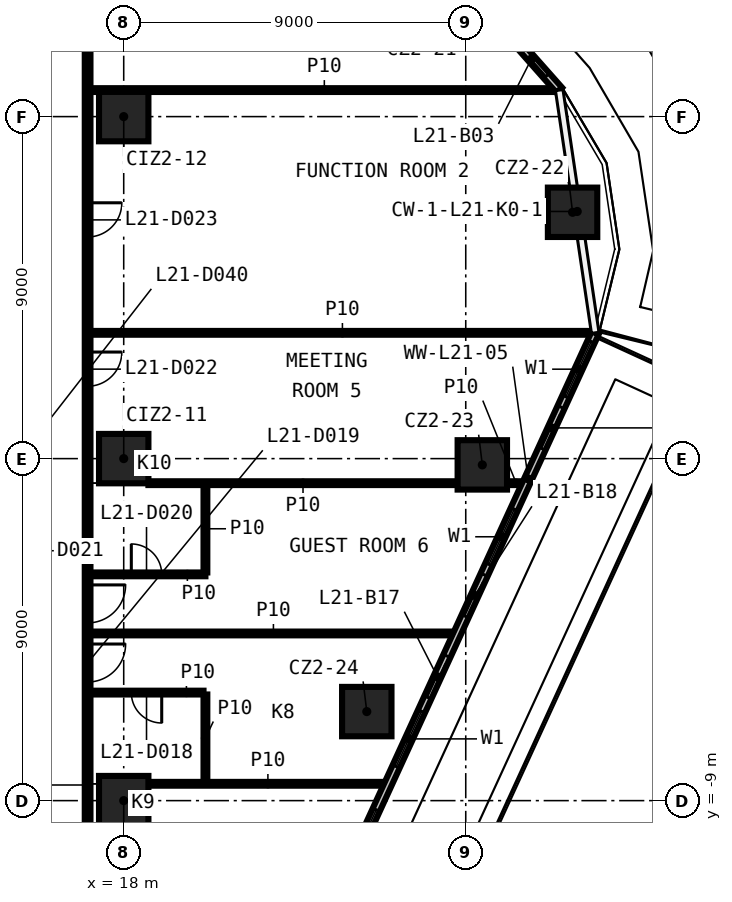
"""IFC4 building model, lengths in metres.
Left out: names, types, materials, properties, quantities, classifications, styles, units other than length and angle.
Written with IfcOpenShell. Run it as: python <this file> out.ifc"""

import sys

from ifc_helpers import new_model, si_unit, direction, frame, frame_2d, origin, origin_2d, place, context, subcontext, project, spatial, rectangle, extrude, element, fill, save


model = new_model("IFC4")
c1 = context("Model", 3, precision=1e-05, world=origin(), true_north=direction((0.0, 1.0)))
c2 = subcontext(c1, "Body", "Model", "MODEL_VIEW")
j1 = project(units=[si_unit("LENGTHUNIT", "METRE"), si_unit("PLANEANGLEUNIT", "RADIAN")], contexts=[c1])
p1 = place(None, origin())
s1 = spatial("IfcSite", under=j1, at=p1, CompositionType="ELEMENT")
p2 = place(p1, origin())
s2 = spatial("IfcBuilding", under=s1, at=p2, CompositionType="ELEMENT")
p3 = place(p2, frame((0.0, 0.0, 102.6)))
s3 = spatial("IfcBuildingStorey", under=s2, at=p3, CompositionType="ELEMENT", Elevation=102.6)
for number, where, z_axis, x_axis in (
    (1, (29.811, 6.482, 0.0), (0.0, 0.0, 1.0), (1.0, 0.0, 0.0)),
    (2, (27.436, -0.165, 0.0), (0.0, 0.0, 1.0), (1.0, 0.0, 0.0)),
    (3, (24.396, -6.657, 0.0), (0.0, 0.0, 1.0), (1.0, 0.0, 0.0)),
    (4, (18.0, -9.0, 0.0), (0.0, 0.0, 1.0), (1.0, 0.0, 0.0)),
    (5, (18.0, 0.0, 0.0), (0.0, 0.0, 1.0), (1.0, 0.0, 0.0)),
    (6, (18.0, 9.0, 0.0), (0.0, 0.0, 1.0), (1.0, 0.0, 0.0)),
):
    element("IfcColumn", number, at=place(p3, frame(where, z_axis=z_axis, x_axis=x_axis)), inside=s3, PredefinedType="COLUMN", context=c2, shape_type="SweptSolid", body=[
        extrude(rectangle(XDim=1.3, YDim=1.3, at=origin_2d()), origin(), (0.0, 0.0, 1.0), 3.3),
    ])
p4 = place(p3, frame((18.65, -8.557, 0.0), z_axis=(0.0, 0.0, 1.0), x_axis=(1.0, 0.0, 0.0)))
e7 = element("IfcWall", 7, at=p4, inside=s3, PredefinedType="PARTITIONING", context=c2, shape_type="SweptSolid", body=[
    extrude(rectangle(XDim=6.288, YDim=0.1, at=frame_2d((3.144, 0.0))), origin(), (0.0, 0.0, 1.0), 3.3),
])
p5 = place(p3, frame((20.1, -6.157, 0.0), z_axis=(0.0, 0.0, 1.0), x_axis=(-1.0, 0.0, 0.0)))
e8 = element("IfcWall", 8, at=p5, inside=s3, PredefinedType="PARTITIONING", context=c2, shape_type="SweptSolid", body=[
    extrude(rectangle(XDim=2.975, YDim=0.1, at=frame_2d((1.488, 0.0))), origin(), (0.0, 0.0, 1.0), 3.3),
])
p6 = place(p5, frame((1.1, 0.0, 0.0)))
e9 = element("IfcOpeningElement", 9, at=p6, cuts=e8, PredefinedType="OPENING", context=c2, shape_type="SweptSolid", body=[
    extrude(rectangle(XDim=0.8, YDim=2.1, at=frame_2d((0.4, 1.05))), frame((0.0, 0.06, 0.0), z_axis=(0.0, -1.0, 0.0), x_axis=(1.0, 0.0, 0.0)), (0.0, 0.0, 1.0), 0.12),
])
p7 = place(p3, frame((17.125, -4.601, 0.0), z_axis=(0.0, 0.0, 1.0), x_axis=(1.0, 0.0, 0.0)))
e10 = element("IfcWall", 10, at=p7, inside=s3, PredefinedType="PARTITIONING", context=c2, shape_type="SweptSolid", body=[
    extrude(rectangle(XDim=9.629, YDim=0.1, at=frame_2d((4.814, 0.0))), origin(), (0.0, 0.0, 1.0), 3.3),
])
p8 = place(p3, frame((17.125, -3.046, 0.0), z_axis=(0.0, 0.0, 1.0), x_axis=(1.0, 0.0, 0.0)))
e11 = element("IfcWall", 11, at=p8, inside=s3, PredefinedType="PARTITIONING", context=c2, shape_type="SweptSolid", body=[
    extrude(rectangle(XDim=3.025, YDim=0.1, at=frame_2d((1.512, 0.0))), origin(), (0.0, 0.0, 1.0), 3.3),
])
p9 = place(p8, frame((1.075, 0.0, 0.0)))
e12 = element("IfcOpeningElement", 12, at=p9, cuts=e11, PredefinedType="OPENING", context=c2, shape_type="SweptSolid", body=[
    extrude(rectangle(XDim=0.8, YDim=2.1, at=frame_2d((0.4, 1.05))), frame((0.0, 0.06, 0.0), z_axis=(0.0, -1.0, 0.0), x_axis=(1.0, 0.0, 0.0)), (0.0, 0.0, 1.0), 0.12),
])
p10 = place(p3, frame((18.65, -0.646, 0.0), z_axis=(0.0, 0.0, 1.0), x_axis=(1.0, 0.0, 0.0)))
e13 = element("IfcWall", 13, at=p10, inside=s3, PredefinedType="PARTITIONING", context=c2, shape_type="SweptSolid", body=[
    extrude(rectangle(XDim=8.136, YDim=0.1, at=frame_2d((4.068, 0.0))), origin(), (0.0, 0.0, 1.0), 3.3),
])
p11 = place(p3, frame((28.086, -0.646, 0.0), z_axis=(0.0, 0.0, 1.0), x_axis=(1.0, 0.0, 0.0)))
e14 = element("IfcWall", 14, at=p11, inside=s3, PredefinedType="PARTITIONING", context=c2, shape_type="SweptSolid", body=[
    extrude(rectangle(XDim=0.483, YDim=0.1, at=frame_2d((0.242, 0.0))), origin(), (0.0, 0.0, 1.0), 3.3),
])
p12 = place(p3, frame((17.125, 3.31, 0.0), z_axis=(0.0, 0.0, 1.0), x_axis=(1.0, 0.0, 0.0)))
e15 = element("IfcWall", 15, at=p12, inside=s3, PredefinedType="PARTITIONING", context=c2, shape_type="SweptSolid", body=[
    extrude(rectangle(XDim=13.26, YDim=0.1, at=frame_2d((6.63, 0.0))), origin(), (0.0, 0.0, 1.0), 3.3),
])
p13 = place(p3, frame((17.125, 9.698, 0.0), z_axis=(0.0, 0.0, 1.0), x_axis=(1.0, 0.0, 0.0)))
e16 = element("IfcWall", 16, at=p13, inside=s3, PredefinedType="PARTITIONING", context=c2, shape_type="SweptSolid", body=[
    extrude(rectangle(XDim=12.308, YDim=0.1, at=frame_2d((6.154, 0.0))), origin(), (0.0, 0.0, 1.0), 3.3),
])
p14 = place(p3, frame((20.15, -8.507, 0.0), z_axis=(0.0, 0.0, 1.0), x_axis=(0.0, 1.0, 0.0)))
e17 = element("IfcWall", 17, at=p14, inside=s3, PredefinedType="PARTITIONING", context=c2, shape_type="SweptSolid", body=[
    extrude(rectangle(XDim=2.3, YDim=0.1, at=frame_2d((1.15, 0.0))), origin(), (0.0, 0.0, 1.0), 3.3),
])
p15 = place(p3, frame((20.15, -2.996, 0.0), z_axis=(0.0, 0.0, 1.0), x_axis=(0.0, 1.0, 0.0)))
e18 = element("IfcWall", 18, at=p15, inside=s3, PredefinedType="PARTITIONING", context=c2, shape_type="SweptSolid", body=[
    extrude(rectangle(XDim=2.3, YDim=0.1, at=frame_2d((1.15, 0.0))), origin(), (0.0, 0.0, 1.0), 3.3),
])
p16 = place(p3, frame((17.05, 13.975, 0.0), z_axis=(0.0, 0.0, 1.0), x_axis=(0.0, -1.0, 0.0)))
e19 = element("IfcWall", 19, at=p16, inside=s3, PredefinedType="PARTITIONING", context=c2, shape_type="SweptSolid", body=[
    extrude(rectangle(XDim=27.95, YDim=0.15, at=frame_2d((13.975, 0.0))), origin(), (0.0, 0.0, 1.0), 3.3),
])
p17 = place(p16, frame((25.274, 0.0, 0.0)))
e20 = element("IfcOpeningElement", 20, at=p17, cuts=e19, PredefinedType="OPENING", context=c2, shape_type="SweptSolid", body=[
    extrude(rectangle(XDim=0.9, YDim=2.1, at=frame_2d((0.45, 1.05))), frame((0.0, 0.085, 0.0), z_axis=(0.0, -1.0, 0.0), x_axis=(1.0, 0.0, 0.0)), (0.0, 0.0, 1.0), 0.17),
])
p18 = place(p16, frame((18.854, 0.0, 0.0)))
e21 = element("IfcOpeningElement", 21, at=p18, cuts=e19, PredefinedType="OPENING", context=c2, shape_type="SweptSolid", body=[
    extrude(rectangle(XDim=1.0, YDim=2.1, at=frame_2d((0.5, 1.05))), frame((0.0, 0.085, 0.0), z_axis=(0.0, -1.0, 0.0), x_axis=(1.0, 0.0, 0.0)), (0.0, 0.0, 1.0), 0.17),
])
p19 = place(p16, frame((17.299, 0.0, 0.0)))
e22 = element("IfcOpeningElement", 22, at=p19, cuts=e19, PredefinedType="OPENING", context=c2, shape_type="SweptSolid", body=[
    extrude(rectangle(XDim=1.0, YDim=2.1, at=frame_2d((0.5, 1.05))), frame((0.0, 0.085, 0.0), z_axis=(0.0, -1.0, 0.0), x_axis=(1.0, 0.0, 0.0)), (0.0, 0.0, 1.0), 0.17),
])
p20 = place(p16, frame((11.171, 0.0, 0.0)))
e23 = element("IfcOpeningElement", 23, at=p20, cuts=e19, PredefinedType="OPENING", context=c2, shape_type="SweptSolid", body=[
    extrude(rectangle(XDim=0.9, YDim=2.1, at=frame_2d((0.45, 1.05))), frame((0.0, 0.085, 0.0), z_axis=(0.0, -1.0, 0.0), x_axis=(1.0, 0.0, 0.0)), (0.0, 0.0, 1.0), 0.17),
])
p21 = place(p16, frame((7.243, 0.0, 0.0)))
e24 = element("IfcOpeningElement", 24, at=p21, cuts=e19, PredefinedType="OPENING", context=c2, shape_type="SweptSolid", body=[
    extrude(rectangle(XDim=0.9, YDim=2.1, at=frame_2d((0.45, 1.05))), frame((0.0, 0.085, 0.0), z_axis=(0.0, -1.0, 0.0), x_axis=(1.0, 0.0, 0.0)), (0.0, 0.0, 1.0), 0.17),
])
p22 = place(p16, frame((2.153, 0.0, 0.0)))
e25 = element("IfcOpeningElement", 25, at=p22, cuts=e19, PredefinedType="OPENING", context=c2, shape_type="SweptSolid", body=[
    extrude(rectangle(XDim=0.9, YDim=2.1, at=frame_2d((0.45, 1.05))), frame((0.0, 0.085, 0.0), z_axis=(0.0, -1.0, 0.0), x_axis=(1.0, 0.0, 0.0)), (0.0, 0.0, 1.0), 0.17),
])
p23 = place(p3, frame((29.46, 9.698, 0.0), z_axis=(0.0, 0.0, 1.0), x_axis=(-0.662868291848, 0.748736020011, 0.0)))
e26 = element("IfcWall", 26, at=p23, inside=s3, PredefinedType="SOLIDWALL", context=c2, shape_type="SweptSolid", body=[
    extrude(rectangle(XDim=4.472, YDim=0.2, at=frame_2d((2.236, 0.0))), origin(), (0.0, 0.0, 1.0), 3.25),
])
p24 = place(p23, frame((2.0, 0.0, 0.6)))
e27 = element("IfcOpeningElement", 27, at=p24, cuts=e26, PredefinedType="OPENING", context=c2, shape_type="SweptSolid", body=[
    extrude(rectangle(XDim=1.6, YDim=2.4, at=frame_2d((0.8, 1.2))), frame((0.0, 0.11, 0.0), z_axis=(0.0, -1.0, 0.0), x_axis=(1.0, 0.0, 0.0)), (0.0, 0.0, 1.0), 0.22),
])
p25 = place(p23, frame((0.5, 0.0, 0.0)))
e28 = element("IfcOpeningElement", 28, at=p25, cuts=e26, PredefinedType="OPENING", context=c2, shape_type="SweptSolid", body=[
    extrude(rectangle(XDim=1.2, YDim=2.4, at=frame_2d((0.6, 1.2))), frame((0.0, 0.11, 0.0), z_axis=(0.0, -1.0, 0.0), x_axis=(1.0, 0.0, 0.0)), (0.0, 0.0, 1.0), 0.22),
])
p26 = place(p3, frame((21.329, -16.468, 0.0), z_axis=(0.0, 0.0, 1.0), x_axis=(0.417117833448, 0.908852415423, 0.0)))
e29 = element("IfcWall", 29, at=p26, inside=s3, PredefinedType="SOLIDWALL", context=c2, shape_type="SweptSolid", body=[
    extrude(rectangle(XDim=21.761, YDim=0.2, at=frame_2d((10.881, 0.0))), origin(), (0.0, 0.0, 1.0), 3.25),
])
p27 = place(p26, frame((2.0, 0.0, 0.6)))
e30 = element("IfcOpeningElement", 30, at=p27, cuts=e29, PredefinedType="OPENING", context=c2, shape_type="SweptSolid", body=[
    extrude(rectangle(XDim=1.6, YDim=2.4, at=frame_2d((0.8, 1.2))), frame((0.0, 0.11, 0.0), z_axis=(0.0, -1.0, 0.0), x_axis=(1.0, 0.0, 0.0)), (0.0, 0.0, 1.0), 0.22),
])
p28 = place(p26, frame((0.5, 0.0, 0.0)))
e31 = element("IfcOpeningElement", 31, at=p28, cuts=e29, PredefinedType="OPENING", context=c2, shape_type="SweptSolid", body=[
    extrude(rectangle(XDim=1.2, YDim=2.4, at=frame_2d((0.6, 1.2))), frame((0.0, 0.11, 0.0), z_axis=(0.0, -1.0, 0.0), x_axis=(1.0, 0.0, 0.0)), (0.0, 0.0, 1.0), 0.22),
])
p29 = place(p26, frame((6.352, 0.0, 0.6)))
e32 = element("IfcOpeningElement", 32, at=p29, cuts=e29, PredefinedType="OPENING", context=c2, shape_type="SweptSolid", body=[
    extrude(rectangle(XDim=1.6, YDim=2.4, at=frame_2d((0.8, 1.2))), frame((0.0, 0.11, 0.0), z_axis=(0.0, -1.0, 0.0), x_axis=(1.0, 0.0, 0.0)), (0.0, 0.0, 1.0), 0.22),
])
p30 = place(p26, frame((4.852, 0.0, 0.0)))
e33 = element("IfcOpeningElement", 33, at=p30, cuts=e29, PredefinedType="OPENING", context=c2, shape_type="SweptSolid", body=[
    extrude(rectangle(XDim=1.2, YDim=2.4, at=frame_2d((0.6, 1.2))), frame((0.0, 0.11, 0.0), z_axis=(0.0, -1.0, 0.0), x_axis=(1.0, 0.0, 0.0)), (0.0, 0.0, 1.0), 0.22),
])
p31 = place(p26, frame((9.205, 0.0, 0.6)))
e34 = element("IfcOpeningElement", 34, at=p31, cuts=e29, PredefinedType="OPENING", context=c2, shape_type="SweptSolid", body=[
    extrude(rectangle(XDim=1.6, YDim=2.4, at=frame_2d((0.8, 1.2))), frame((0.0, 0.11, 0.0), z_axis=(0.0, -1.0, 0.0), x_axis=(1.0, 0.0, 0.0)), (0.0, 0.0, 1.0), 0.22),
])
p32 = place(p26, frame((11.205, 0.0, 0.0)))
e35 = element("IfcOpeningElement", 35, at=p32, cuts=e29, PredefinedType="OPENING", context=c2, shape_type="SweptSolid", body=[
    extrude(rectangle(XDim=1.2, YDim=2.4, at=frame_2d((0.6, 1.2))), frame((0.0, 0.11, 0.0), z_axis=(0.0, -1.0, 0.0), x_axis=(1.0, 0.0, 0.0)), (0.0, 0.0, 1.0), 0.22),
])
p33 = place(p26, frame((15.057, 0.0, 0.6)))
e36 = element("IfcOpeningElement", 36, at=p33, cuts=e29, PredefinedType="OPENING", context=c2, shape_type="SweptSolid", body=[
    extrude(rectangle(XDim=1.6, YDim=2.4, at=frame_2d((0.8, 1.2))), frame((0.0, 0.11, 0.0), z_axis=(0.0, -1.0, 0.0), x_axis=(1.0, 0.0, 0.0)), (0.0, 0.0, 1.0), 0.22),
])
p34 = place(p26, frame((13.557, 0.0, 0.0)))
e37 = element("IfcOpeningElement", 37, at=p34, cuts=e29, PredefinedType="OPENING", context=c2, shape_type="SweptSolid", body=[
    extrude(rectangle(XDim=1.2, YDim=2.4, at=frame_2d((0.6, 1.2))), frame((0.0, 0.11, 0.0), z_axis=(0.0, -1.0, 0.0), x_axis=(1.0, 0.0, 0.0)), (0.0, 0.0, 1.0), 0.22),
])
p35 = place(p26, frame((19.909, 0.0, 0.6)))
e38 = element("IfcOpeningElement", 38, at=p35, cuts=e29, PredefinedType="OPENING", context=c2, shape_type="SweptSolid", body=[
    extrude(rectangle(XDim=1.6, YDim=2.4, at=frame_2d((0.8, 1.2))), frame((0.0, 0.11, 0.0), z_axis=(0.0, -1.0, 0.0), x_axis=(1.0, 0.0, 0.0)), (0.0, 0.0, 1.0), 0.22),
])
p36 = place(p26, frame((18.409, 0.0, 0.0)))
e39 = element("IfcOpeningElement", 39, at=p36, cuts=e29, PredefinedType="OPENING", context=c2, shape_type="SweptSolid", body=[
    extrude(rectangle(XDim=1.2, YDim=2.4, at=frame_2d((0.6, 1.2))), frame((0.0, 0.11, 0.0), z_axis=(0.0, -1.0, 0.0), x_axis=(1.0, 0.0, 0.0)), (0.0, 0.0, 1.0), 0.22),
])
p37 = place(p6, origin())
e40 = element("IfcDoor", 40, at=p37, inside=s3, OperationType="SINGLE_SWING_LEFT", PredefinedType="DOOR", context=c2, shape_type="SweptSolid", body=[
    extrude(rectangle(XDim=0.8, YDim=2.1, at=frame_2d((0.4, 1.05))), frame((0.0, 0.025, 0.0), z_axis=(0.0, -1.0, 0.0), x_axis=(1.0, 0.0, 0.0)), (0.0, 0.0, 1.0), 0.05),
])
fill(e9, e40)
p38 = place(p18, origin())
e41 = element("IfcDoor", 41, at=p38, inside=s3, OperationType="SINGLE_SWING_RIGHT", PredefinedType="DOOR", context=c2, shape_type="SweptSolid", body=[
    extrude(rectangle(XDim=1.0, YDim=2.1, at=frame_2d((0.5, 1.05))), frame((0.0, 0.025, 0.0), z_axis=(0.0, -1.0, 0.0), x_axis=(1.0, 0.0, 0.0)), (0.0, 0.0, 1.0), 0.05),
])
fill(e21, e41)
p39 = place(p9, origin())
e42 = element("IfcDoor", 42, at=p39, inside=s3, OperationType="SINGLE_SWING_RIGHT", PredefinedType="DOOR", context=c2, shape_type="SweptSolid", body=[
    extrude(rectangle(XDim=0.8, YDim=2.1, at=frame_2d((0.4, 1.05))), frame((0.0, 0.025, 0.0), z_axis=(0.0, -1.0, 0.0), x_axis=(1.0, 0.0, 0.0)), (0.0, 0.0, 1.0), 0.05),
])
fill(e12, e42)
p40 = place(p19, origin())
e43 = element("IfcDoor", 43, at=p40, inside=s3, OperationType="SINGLE_SWING_LEFT", PredefinedType="DOOR", context=c2, shape_type="SweptSolid", body=[
    extrude(rectangle(XDim=1.0, YDim=2.1, at=frame_2d((0.5, 1.05))), frame((0.0, 0.025, 0.0), z_axis=(0.0, -1.0, 0.0), x_axis=(1.0, 0.0, 0.0)), (0.0, 0.0, 1.0), 0.05),
])
fill(e22, e43)
p41 = place(p20, origin())
e44 = element("IfcDoor", 44, at=p41, inside=s3, OperationType="SINGLE_SWING_RIGHT", PredefinedType="DOOR", context=c2, shape_type="SweptSolid", body=[
    extrude(rectangle(XDim=0.9, YDim=2.1, at=frame_2d((0.45, 1.05))), frame((0.0, 0.025, 0.0), z_axis=(0.0, -1.0, 0.0), x_axis=(1.0, 0.0, 0.0)), (0.0, 0.0, 1.0), 0.05),
])
fill(e23, e44)
p42 = place(p21, origin())
e45 = element("IfcDoor", 45, at=p42, inside=s3, OperationType="SINGLE_SWING_LEFT", PredefinedType="DOOR", context=c2, shape_type="SweptSolid", body=[
    extrude(rectangle(XDim=0.9, YDim=2.1, at=frame_2d((0.45, 1.05))), frame((0.0, 0.025, 0.0), z_axis=(0.0, -1.0, 0.0), x_axis=(1.0, 0.0, 0.0)), (0.0, 0.0, 1.0), 0.05),
])
fill(e24, e45)
p43 = place(p25, origin())
e46 = element("IfcDoor", 46, at=p43, inside=s3, OperationType="SLIDING_TO_LEFT", PredefinedType="DOOR", context=c2, shape_type="SweptSolid", body=[
    extrude(rectangle(XDim=1.2, YDim=2.4, at=frame_2d((0.6, 1.2))), frame((0.0, 0.025, 0.0), z_axis=(0.0, -1.0, 0.0), x_axis=(1.0, 0.0, 0.0)), (0.0, 0.0, 1.0), 0.05),
])
fill(e28, e46)
p44 = place(p29, origin())
e47 = element("IfcWindow", 47, at=p44, inside=s3, PartitioningType="SINGLE_PANEL", PredefinedType="WINDOW", context=c2, shape_type="SweptSolid", body=[
    extrude(rectangle(XDim=1.6, YDim=2.4, at=frame_2d((0.8, 1.2))), frame((0.0, 0.03, 0.0), z_axis=(0.0, -1.0, 0.0), x_axis=(1.0, 0.0, 0.0)), (0.0, 0.0, 1.0), 0.06),
])
fill(e32, e47)
p45 = place(p31, origin())
e48 = element("IfcWindow", 48, at=p45, inside=s3, PartitioningType="SINGLE_PANEL", PredefinedType="WINDOW", context=c2, shape_type="SweptSolid", body=[
    extrude(rectangle(XDim=1.6, YDim=2.4, at=frame_2d((0.8, 1.2))), frame((0.0, 0.03, 0.0), z_axis=(0.0, -1.0, 0.0), x_axis=(1.0, 0.0, 0.0)), (0.0, 0.0, 1.0), 0.06),
])
fill(e34, e48)
p46 = place(p32, origin())
e49 = element("IfcDoor", 49, at=p46, inside=s3, OperationType="SLIDING_TO_LEFT", PredefinedType="DOOR", context=c2, shape_type="SweptSolid", body=[
    extrude(rectangle(XDim=1.2, YDim=2.4, at=frame_2d((0.6, 1.2))), frame((0.0, 0.025, 0.0), z_axis=(0.0, -1.0, 0.0), x_axis=(1.0, 0.0, 0.0)), (0.0, 0.0, 1.0), 0.05),
])
fill(e35, e49)
p47 = place(p33, origin())
e50 = element("IfcWindow", 50, at=p47, inside=s3, PartitioningType="SINGLE_PANEL", PredefinedType="WINDOW", context=c2, shape_type="SweptSolid", body=[
    extrude(rectangle(XDim=1.6, YDim=2.4, at=frame_2d((0.8, 1.2))), frame((0.0, 0.03, 0.0), z_axis=(0.0, -1.0, 0.0), x_axis=(1.0, 0.0, 0.0)), (0.0, 0.0, 1.0), 0.06),
])
fill(e36, e50)
p48 = place(p34, origin())
e51 = element("IfcDoor", 51, at=p48, inside=s3, OperationType="SLIDING_TO_LEFT", PredefinedType="DOOR", context=c2, shape_type="SweptSolid", body=[
    extrude(rectangle(XDim=1.2, YDim=2.4, at=frame_2d((0.6, 1.2))), frame((0.0, 0.025, 0.0), z_axis=(0.0, -1.0, 0.0), x_axis=(1.0, 0.0, 0.0)), (0.0, 0.0, 1.0), 0.05),
])
fill(e37, e51)
p49 = place(p35, origin())
e52 = element("IfcWindow", 52, at=p49, inside=s3, PartitioningType="SINGLE_PANEL", PredefinedType="WINDOW", context=c2, shape_type="SweptSolid", body=[
    extrude(rectangle(XDim=1.6, YDim=2.4, at=frame_2d((0.8, 1.2))), frame((0.0, 0.03, 0.0), z_axis=(0.0, -1.0, 0.0), x_axis=(1.0, 0.0, 0.0)), (0.0, 0.0, 1.0), 0.06),
])
fill(e38, e52)
p50 = place(p36, origin())
e53 = element("IfcDoor", 53, at=p50, inside=s3, OperationType="SLIDING_TO_LEFT", PredefinedType="DOOR", context=c2, shape_type="SweptSolid", body=[
    extrude(rectangle(XDim=1.2, YDim=2.4, at=frame_2d((0.6, 1.2))), frame((0.0, 0.025, 0.0), z_axis=(0.0, -1.0, 0.0), x_axis=(1.0, 0.0, 0.0)), (0.0, 0.0, 1.0), 0.05),
])
fill(e39, e53)
save(model, sys.argv[1])
